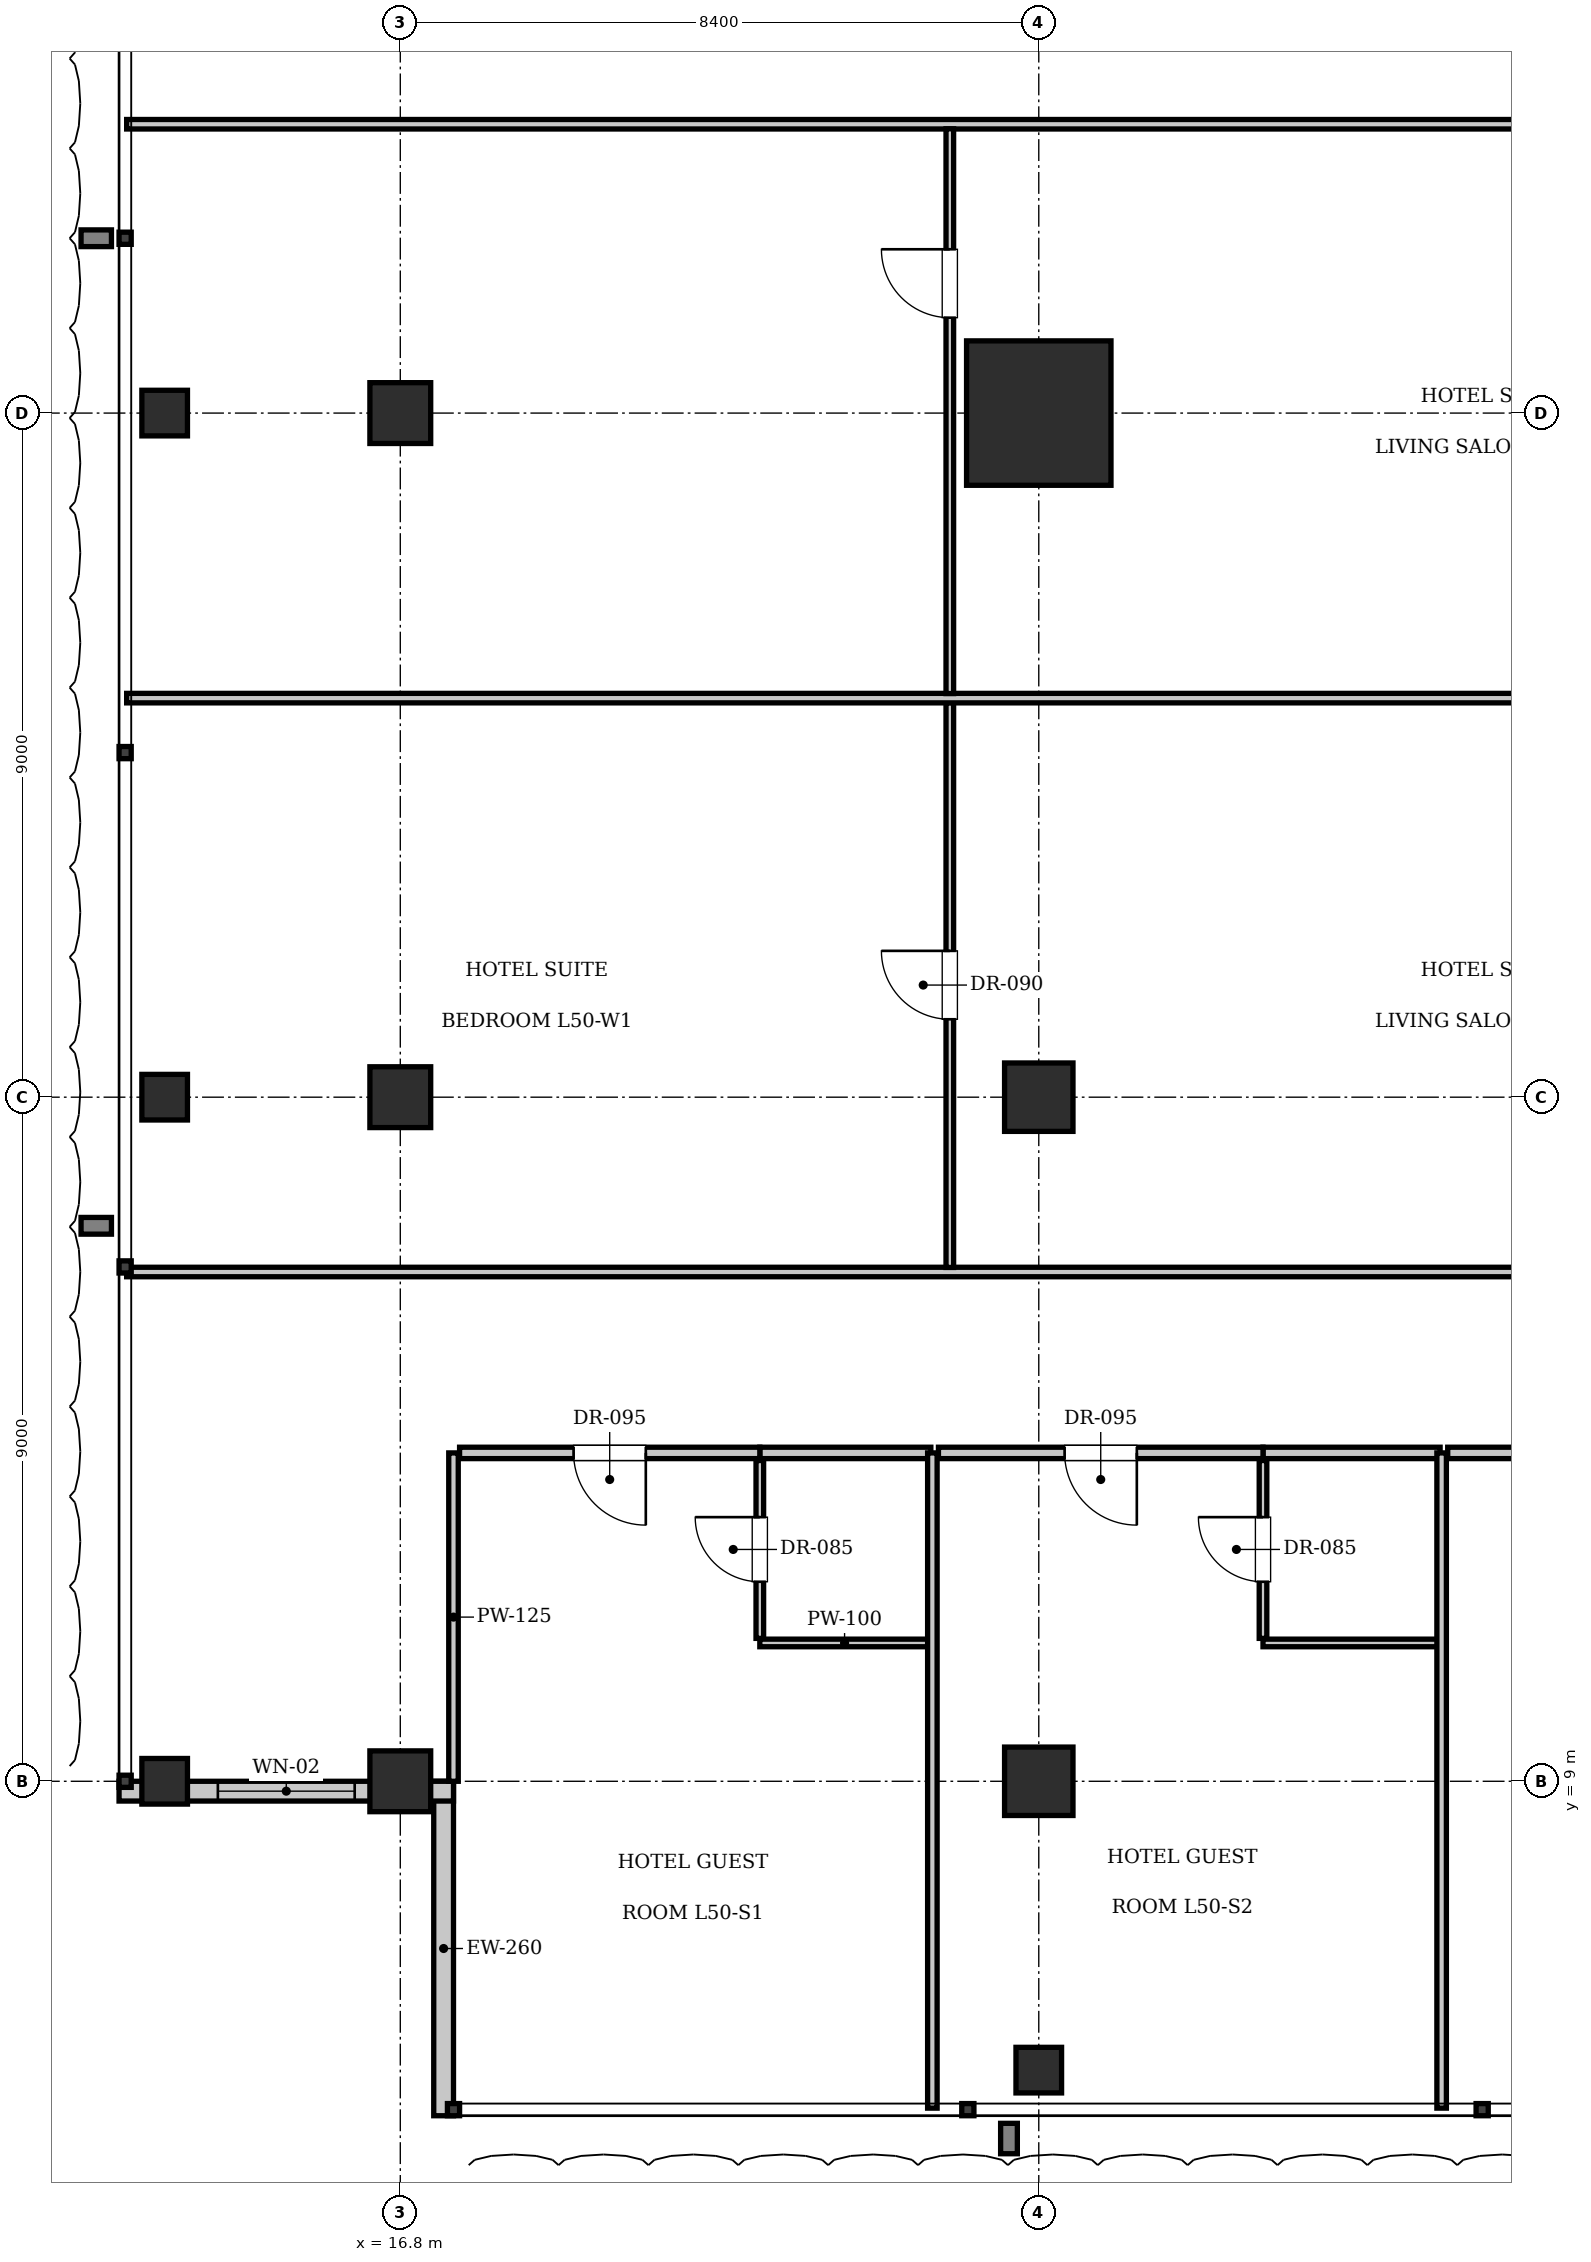
"""IFC4 building model, lengths in metres.
Left out: names, types, materials, properties, quantities, classifications, styles, units other than length and angle.
Written with IfcOpenShell. Run it as: python <this file> out.ifc"""

import sys

from ifc_helpers import new_model, si_unit, direction, frame, frame_2d, origin, origin_2d, place, context, subcontext, project, spatial, rectangle, i_section, extrude, element, fill, save


model = new_model("IFC4")
c1 = context("Model", 3, precision=1e-05, world=origin(), true_north=direction((0.0, 1.0)))
c2 = subcontext(c1, "Body", "Model", "MODEL_VIEW")
j1 = project(units=[si_unit("LENGTHUNIT", "METRE"), si_unit("PLANEANGLEUNIT", "RADIAN")], contexts=[c1])
p1 = place(None, origin())
s1 = spatial("IfcSite", under=j1, at=p1, CompositionType="ELEMENT")
p2 = place(p1, origin())
s2 = spatial("IfcBuilding", under=s1, at=p2, CompositionType="ELEMENT")
p3 = place(p2, frame((0.0, 0.0, 204.4)))
s3 = spatial("IfcBuildingStorey", under=s2, at=p3, CompositionType="ELEMENT", Elevation=204.4)
p4 = place(p3, frame((25.2, 27.0, 0.0), z_axis=(0.0, 0.0, 1.0), x_axis=(1.0, 0.0, 0.0)))
e1 = element("IfcColumn", 1, at=p4, inside=s3, PredefinedType="COLUMN", context=c2, shape_type="SweptSolid", body=[
    extrude(rectangle(XDim=1.9, YDim=1.9, at=origin_2d()), origin(), (0.0, 0.0, 1.0), 3.85),
])
for number, where, z_axis, x_axis in (
    (2, (25.2, 18.0, 0.0), (0.0, 0.0, 1.0), (1.0, 0.0, 0.0)),
    (3, (25.2, 9.0, 0.0), (0.0, 0.0, 1.0), (1.0, 0.0, 0.0)),
):
    element("IfcColumn", number, at=place(p3, frame(where, z_axis=z_axis, x_axis=x_axis)), inside=s3, PredefinedType="COLUMN", context=c2, shape_type="SweptSolid", body=[
        extrude(rectangle(XDim=0.9, YDim=0.9, at=origin_2d()), origin(), (0.0, 0.0, 1.0), 3.85),
    ])
for number, where, z_axis, x_axis in (
    (4, (16.8, 9.0, 0.0), (0.0, 0.0, 1.0), (1.0, 0.0, 0.0)),
    (5, (16.8, 18.0, 0.0), (0.0, 0.0, 1.0), (1.0, 0.0, 0.0)),
    (6, (16.8, 27.0, 0.0), (0.0, 0.0, 1.0), (1.0, 0.0, 0.0)),
):
    element("IfcColumn", number, at=place(p3, frame(where, z_axis=z_axis, x_axis=x_axis)), inside=s3, PredefinedType="COLUMN", context=c2, shape_type="SweptSolid", body=[
        extrude(rectangle(XDim=0.8, YDim=0.8, at=origin_2d()), origin(), (0.0, 0.0, 1.0), 3.85),
    ])
for number, where, z_axis, x_axis in (
    (7, (13.7, 9.0, 0.0), (0.0, 0.0, 1.0), (1.0, 0.0, 0.0)),
    (8, (13.7, 18.0, 0.0), (0.0, 0.0, 1.0), (1.0, 0.0, 0.0)),
    (9, (13.7, 27.0, 0.0), (0.0, 0.0, 1.0), (1.0, 0.0, 0.0)),
    (10, (25.2, 5.2, 0.0), (0.0, 0.0, 1.0), (1.0, 0.0, 0.0)),
):
    element("IfcColumn", number, at=place(p3, frame(where, z_axis=z_axis, x_axis=x_axis)), inside=s3, PredefinedType="COLUMN", context=c2, shape_type="SweptSolid", body=[
        extrude(i_section(OverallWidth=0.6, OverallDepth=0.6, WebThickness=0.025, FlangeThickness=0.038, at=origin_2d()), origin(), (0.0, 0.0, 1.0), 3.85),
    ])
p5 = place(p3, frame((17.37, 4.6, 0.0), z_axis=(0.0, 0.0, 1.0), x_axis=(0.0, 1.0, 0.0)))
e11 = element("IfcWall", 11, at=p5, inside=s3, PredefinedType="SOLIDWALL", context=c2, shape_type="SweptSolid", body=[
    extrude(rectangle(XDim=4.4, YDim=0.26, at=frame_2d((2.2, 0.0))), origin(), (0.0, 0.0, 1.0), 3.61),
])
p6 = place(p3, frame((17.5, 8.87, 0.0), z_axis=(0.0, 0.0, 1.0), x_axis=(-1.0, 0.0, 0.0)))
e12 = element("IfcWall", 12, at=p6, inside=s3, PredefinedType="SOLIDWALL", context=c2, shape_type="SweptSolid", body=[
    extrude(rectangle(XDim=4.4, YDim=0.26, at=frame_2d((2.2, 0.0))), origin(), (0.0, 0.0, 1.0), 3.071),
])
p7 = place(p6, frame((1.3, 0.0, 0.9)))
e13 = element("IfcOpeningElement", 13, at=p7, cuts=e12, PredefinedType="OPENING", context=c2, shape_type="SweptSolid", body=[
    extrude(rectangle(XDim=1.8, YDim=2.1, at=frame_2d((0.9, 1.05))), frame((0.0, 0.14, 0.0), z_axis=(0.0, -1.0, 0.0), x_axis=(1.0, 0.0, 0.0)), (0.0, 0.0, 1.0), 0.28),
])
p8 = place(p3, frame((17.5, 9.0, 0.0), z_axis=(0.0, 0.0, 1.0), x_axis=(0.0, 1.0, 0.0)))
e14 = element("IfcWall", 14, at=p8, inside=s3, PredefinedType="PARTITIONING", context=c2, shape_type="SweptSolid", body=[
    extrude(rectangle(XDim=4.32, YDim=0.125, at=frame_2d((2.16, 0.0))), origin(), (0.0, 0.0, 1.0), 3.61),
])
p9 = place(p3, frame((21.53, 13.32, 0.0), z_axis=(0.0, 0.0, 1.0), x_axis=(1.0, 0.0, 0.0)))
e15 = element("IfcWall", 15, at=p9, inside=s3, PredefinedType="PARTITIONING", context=c2, shape_type="SweptSolid", body=[
    extrude(rectangle(XDim=2.25, YDim=0.15, at=frame_2d((1.125, 0.0))), origin(), (0.0, 0.0, 1.0), 3.61),
])
p10 = place(p3, frame((21.53, 10.82, 0.0), z_axis=(0.0, 0.0, 1.0), x_axis=(1.0, 0.0, 0.0)))
e16 = element("IfcWall", 16, at=p10, inside=s3, PredefinedType="PARTITIONING", context=c2, shape_type="SweptSolid", body=[
    extrude(rectangle(XDim=2.23, YDim=0.1, at=frame_2d((1.115, 0.0))), origin(), (0.0, 0.0, 1.0), 3.61),
])
p11 = place(p3, frame((21.53, 10.88, 0.0), z_axis=(0.0, 0.0, 1.0), x_axis=(0.0, 1.0, 0.0)))
e17 = element("IfcWall", 17, at=p11, inside=s3, PredefinedType="PARTITIONING", context=c2, shape_type="SweptSolid", body=[
    extrude(rectangle(XDim=2.34, YDim=0.1, at=frame_2d((1.17, 0.0))), origin(), (0.0, 0.0, 1.0), 3.61),
])
p12 = place(p11, frame((0.745, 0.0, 0.0)))
e18 = element("IfcOpeningElement", 18, at=p12, cuts=e17, PredefinedType="OPENING", context=c2, shape_type="SweptSolid", body=[
    extrude(rectangle(XDim=0.85, YDim=2.1, at=frame_2d((0.425, 1.05))), frame((0.0, 0.06, 0.0), z_axis=(0.0, -1.0, 0.0), x_axis=(1.0, 0.0, 0.0)), (0.0, 0.0, 1.0), 0.12),
])
p13 = place(p3, frame((17.58, 13.32, 0.0), z_axis=(0.0, 0.0, 1.0), x_axis=(1.0, 0.0, 0.0)))
e19 = element("IfcWall", 19, at=p13, inside=s3, PredefinedType="PARTITIONING", context=c2, shape_type="SweptSolid", body=[
    extrude(rectangle(XDim=3.95, YDim=0.15, at=frame_2d((1.975, 0.0))), origin(), (0.0, 0.0, 1.0), 3.61),
])
p14 = place(p13, frame((1.5, 0.0, 0.0)))
e20 = element("IfcOpeningElement", 20, at=p14, cuts=e19, PredefinedType="OPENING", context=c2, shape_type="SweptSolid", body=[
    extrude(rectangle(XDim=0.95, YDim=2.15, at=frame_2d((0.475, 1.075))), frame((0.0, 0.085, 0.0), z_axis=(0.0, -1.0, 0.0), x_axis=(1.0, 0.0, 0.0)), (0.0, 0.0, 1.0), 0.17),
])
p15 = place(p3, frame((23.8, 4.7, 0.0), z_axis=(0.0, 0.0, 1.0), x_axis=(0.0, 1.0, 0.0)))
e21 = element("IfcWall", 21, at=p15, inside=s3, PredefinedType="PARTITIONING", context=c2, shape_type="SweptSolid", body=[
    extrude(rectangle(XDim=8.62, YDim=0.125, at=frame_2d((4.31, 0.0))), origin(), (0.0, 0.0, 1.0), 3.61),
])
p16 = place(p3, frame((28.15, 13.32, 0.0), z_axis=(0.0, 0.0, 1.0), x_axis=(1.0, 0.0, 0.0)))
e22 = element("IfcWall", 22, at=p16, inside=s3, PredefinedType="PARTITIONING", context=c2, shape_type="SweptSolid", body=[
    extrude(rectangle(XDim=2.33, YDim=0.15, at=frame_2d((1.165, 0.0))), origin(), (0.0, 0.0, 1.0), 3.61),
])
p17 = place(p3, frame((28.15, 10.82, 0.0), z_axis=(0.0, 0.0, 1.0), x_axis=(1.0, 0.0, 0.0)))
e23 = element("IfcWall", 23, at=p17, inside=s3, PredefinedType="PARTITIONING", context=c2, shape_type="SweptSolid", body=[
    extrude(rectangle(XDim=2.31, YDim=0.1, at=frame_2d((1.155, 0.0))), origin(), (0.0, 0.0, 1.0), 3.61),
])
p18 = place(p3, frame((28.15, 10.88, 0.0), z_axis=(0.0, 0.0, 1.0), x_axis=(0.0, 1.0, 0.0)))
e24 = element("IfcWall", 24, at=p18, inside=s3, PredefinedType="PARTITIONING", context=c2, shape_type="SweptSolid", body=[
    extrude(rectangle(XDim=2.34, YDim=0.1, at=frame_2d((1.17, 0.0))), origin(), (0.0, 0.0, 1.0), 3.61),
])
p19 = place(p18, frame((0.745, 0.0, 0.0)))
e25 = element("IfcOpeningElement", 25, at=p19, cuts=e24, PredefinedType="OPENING", context=c2, shape_type="SweptSolid", body=[
    extrude(rectangle(XDim=0.85, YDim=2.1, at=frame_2d((0.425, 1.05))), frame((0.0, 0.06, 0.0), z_axis=(0.0, -1.0, 0.0), x_axis=(1.0, 0.0, 0.0)), (0.0, 0.0, 1.0), 0.12),
])
p20 = place(p3, frame((23.88, 13.32, 0.0), z_axis=(0.0, 0.0, 1.0), x_axis=(1.0, 0.0, 0.0)))
e26 = element("IfcWall", 26, at=p20, inside=s3, PredefinedType="PARTITIONING", context=c2, shape_type="SweptSolid", body=[
    extrude(rectangle(XDim=4.27, YDim=0.15, at=frame_2d((2.135, 0.0))), origin(), (0.0, 0.0, 1.0), 3.61),
])
p21 = place(p20, frame((1.66, 0.0, 0.0)))
e27 = element("IfcOpeningElement", 27, at=p21, cuts=e26, PredefinedType="OPENING", context=c2, shape_type="SweptSolid", body=[
    extrude(rectangle(XDim=0.95, YDim=2.15, at=frame_2d((0.475, 1.075))), frame((0.0, 0.085, 0.0), z_axis=(0.0, -1.0, 0.0), x_axis=(1.0, 0.0, 0.0)), (0.0, 0.0, 1.0), 0.17),
])
p22 = place(p3, frame((30.5, 4.7, 0.0), z_axis=(0.0, 0.0, 1.0), x_axis=(0.0, 1.0, 0.0)))
e28 = element("IfcWall", 28, at=p22, inside=s3, PredefinedType="PARTITIONING", context=c2, shape_type="SweptSolid", body=[
    extrude(rectangle(XDim=8.62, YDim=0.125, at=frame_2d((4.31, 0.0))), origin(), (0.0, 0.0, 1.0), 3.61),
])
p23 = place(p3, frame((30.58, 13.32, 0.0), z_axis=(0.0, 0.0, 1.0), x_axis=(1.0, 0.0, 0.0)))
e29 = element("IfcWall", 29, at=p23, inside=s3, PredefinedType="PARTITIONING", context=c2, shape_type="SweptSolid", body=[
    extrude(rectangle(XDim=4.87, YDim=0.15, at=frame_2d((2.435, 0.0))), origin(), (0.0, 0.0, 1.0), 3.61),
])
p24 = place(p23, frame((1.96, 0.0, 0.0)))
e30 = element("IfcOpeningElement", 30, at=p24, cuts=e29, PredefinedType="OPENING", context=c2, shape_type="SweptSolid", body=[
    extrude(rectangle(XDim=0.95, YDim=2.15, at=frame_2d((0.475, 1.075))), frame((0.0, 0.085, 0.0), z_axis=(0.0, -1.0, 0.0), x_axis=(1.0, 0.0, 0.0)), (0.0, 0.0, 1.0), 0.17),
])
for number, where, z_axis, x_axis in (
    (31, (13.2, 15.7, 0.0), (0.0, 0.0, 1.0), (1.0, 0.0, 0.0)),
    (32, (13.2, 30.8, 0.0), (0.0, 0.0, 1.0), (1.0, 0.0, 0.0)),
):
    element("IfcWall", number, at=place(p3, frame(where, z_axis=z_axis, x_axis=x_axis)), inside=s3, PredefinedType="PARTITIONING", context=c2, shape_type="SweptSolid", body=[
        extrude(rectangle(XDim=25.12, YDim=0.125, at=frame_2d((12.56, 0.0))), origin(), (0.0, 0.0, 1.0), 3.61),
    ])
p25 = place(p3, frame((24.03, 15.76, 0.0), z_axis=(0.0, 0.0, 1.0), x_axis=(0.0, 1.0, 0.0)))
e33 = element("IfcWall", 33, at=p25, inside=s3, PredefinedType="PARTITIONING", context=c2, shape_type="SweptSolid", body=[
    extrude(rectangle(XDim=7.43, YDim=0.1, at=frame_2d((3.715, 0.0))), origin(), (0.0, 0.0, 1.0), 3.61),
])
p26 = place(p25, frame((3.265, 0.0, 0.0)))
e34 = element("IfcOpeningElement", 34, at=p26, cuts=e33, PredefinedType="OPENING", context=c2, shape_type="SweptSolid", body=[
    extrude(rectangle(XDim=0.9, YDim=2.1, at=frame_2d((0.45, 1.05))), frame((0.0, 0.06, 0.0), z_axis=(0.0, -1.0, 0.0), x_axis=(1.0, 0.0, 0.0)), (0.0, 0.0, 1.0), 0.12),
])
p27 = place(p3, frame((13.2, 23.25, 0.0), z_axis=(0.0, 0.0, 1.0), x_axis=(1.0, 0.0, 0.0)))
e35 = element("IfcWall", 35, at=p27, inside=s3, PredefinedType="PARTITIONING", context=c2, shape_type="SweptSolid", body=[
    extrude(rectangle(XDim=25.12, YDim=0.125, at=frame_2d((12.56, 0.0))), origin(), (0.0, 0.0, 1.0), 3.61),
])
p28 = place(p3, frame((24.03, 23.31, 0.0), z_axis=(0.0, 0.0, 1.0), x_axis=(0.0, 1.0, 0.0)))
e36 = element("IfcWall", 36, at=p28, inside=s3, PredefinedType="PARTITIONING", context=c2, shape_type="SweptSolid", body=[
    extrude(rectangle(XDim=7.43, YDim=0.1, at=frame_2d((3.715, 0.0))), origin(), (0.0, 0.0, 1.0), 3.61),
])
p29 = place(p28, frame((4.945, 0.0, 0.0)))
e37 = element("IfcOpeningElement", 37, at=p29, cuts=e36, PredefinedType="OPENING", context=c2, shape_type="SweptSolid", body=[
    extrude(rectangle(XDim=0.9, YDim=2.1, at=frame_2d((0.45, 1.05))), frame((0.0, 0.06, 0.0), z_axis=(0.0, -1.0, 0.0), x_axis=(1.0, 0.0, 0.0)), (0.0, 0.0, 1.0), 0.12),
])
p30 = place(p7, origin())
e38 = element("IfcWindow", 38, at=p30, inside=s3, PartitioningType="SINGLE_PANEL", PredefinedType="WINDOW", context=c2, shape_type="SweptSolid", body=[
    extrude(rectangle(XDim=1.8, YDim=2.1, at=frame_2d((0.9, 1.05))), frame((0.0, 0.03, 0.0), z_axis=(0.0, -1.0, 0.0), x_axis=(1.0, 0.0, 0.0)), (0.0, 0.0, 1.0), 0.06),
])
fill(e13, e38)
p31 = place(p12, origin())
e39 = element("IfcDoor", 39, at=p31, inside=s3, OperationType="SINGLE_SWING_RIGHT", PredefinedType="DOOR", context=c2, shape_type="SweptSolid", body=[
    extrude(rectangle(XDim=0.85, YDim=2.1, at=frame_2d((0.425, 1.05))), frame((0.0, 0.025, 0.0), z_axis=(0.0, -1.0, 0.0), x_axis=(1.0, 0.0, 0.0)), (0.0, 0.0, 1.0), 0.05),
])
fill(e18, e39)
p32 = place(p14, frame((0.95, 0.0, 0.0), z_axis=(0.0, 0.0, 1.0), x_axis=(-1.0, 0.0, 0.0)))
e40 = element("IfcDoor", 40, at=p32, inside=s3, OperationType="SINGLE_SWING_LEFT", PredefinedType="DOOR", context=c2, shape_type="SweptSolid", body=[
    extrude(rectangle(XDim=0.95, YDim=2.15, at=frame_2d((0.475, 1.075))), frame((0.0, 0.025, 0.0), z_axis=(0.0, -1.0, 0.0), x_axis=(1.0, 0.0, 0.0)), (0.0, 0.0, 1.0), 0.05),
])
fill(e20, e40)
p33 = place(p19, origin())
e41 = element("IfcDoor", 41, at=p33, inside=s3, OperationType="SINGLE_SWING_RIGHT", PredefinedType="DOOR", context=c2, shape_type="SweptSolid", body=[
    extrude(rectangle(XDim=0.85, YDim=2.1, at=frame_2d((0.425, 1.05))), frame((0.0, 0.025, 0.0), z_axis=(0.0, -1.0, 0.0), x_axis=(1.0, 0.0, 0.0)), (0.0, 0.0, 1.0), 0.05),
])
fill(e25, e41)
p34 = place(p21, frame((0.95, 0.0, 0.0), z_axis=(0.0, 0.0, 1.0), x_axis=(-1.0, 0.0, 0.0)))
e42 = element("IfcDoor", 42, at=p34, inside=s3, OperationType="SINGLE_SWING_LEFT", PredefinedType="DOOR", context=c2, shape_type="SweptSolid", body=[
    extrude(rectangle(XDim=0.95, YDim=2.15, at=frame_2d((0.475, 1.075))), frame((0.0, 0.025, 0.0), z_axis=(0.0, -1.0, 0.0), x_axis=(1.0, 0.0, 0.0)), (0.0, 0.0, 1.0), 0.05),
])
fill(e27, e42)
p35 = place(p26, origin())
e43 = element("IfcDoor", 43, at=p35, inside=s3, OperationType="SINGLE_SWING_RIGHT", PredefinedType="DOOR", context=c2, shape_type="SweptSolid", body=[
    extrude(rectangle(XDim=0.9, YDim=2.1, at=frame_2d((0.45, 1.05))), frame((0.0, 0.025, 0.0), z_axis=(0.0, -1.0, 0.0), x_axis=(1.0, 0.0, 0.0)), (0.0, 0.0, 1.0), 0.05),
])
fill(e34, e43)
p36 = place(p29, origin())
e44 = element("IfcDoor", 44, at=p36, inside=s3, OperationType="SINGLE_SWING_RIGHT", PredefinedType="DOOR", context=c2, shape_type="SweptSolid", body=[
    extrude(rectangle(XDim=0.9, YDim=2.1, at=frame_2d((0.45, 1.05))), frame((0.0, 0.025, 0.0), z_axis=(0.0, -1.0, 0.0), x_axis=(1.0, 0.0, 0.0)), (0.0, 0.0, 1.0), 0.05),
])
fill(e37, e44)
save(model, sys.argv[1])
